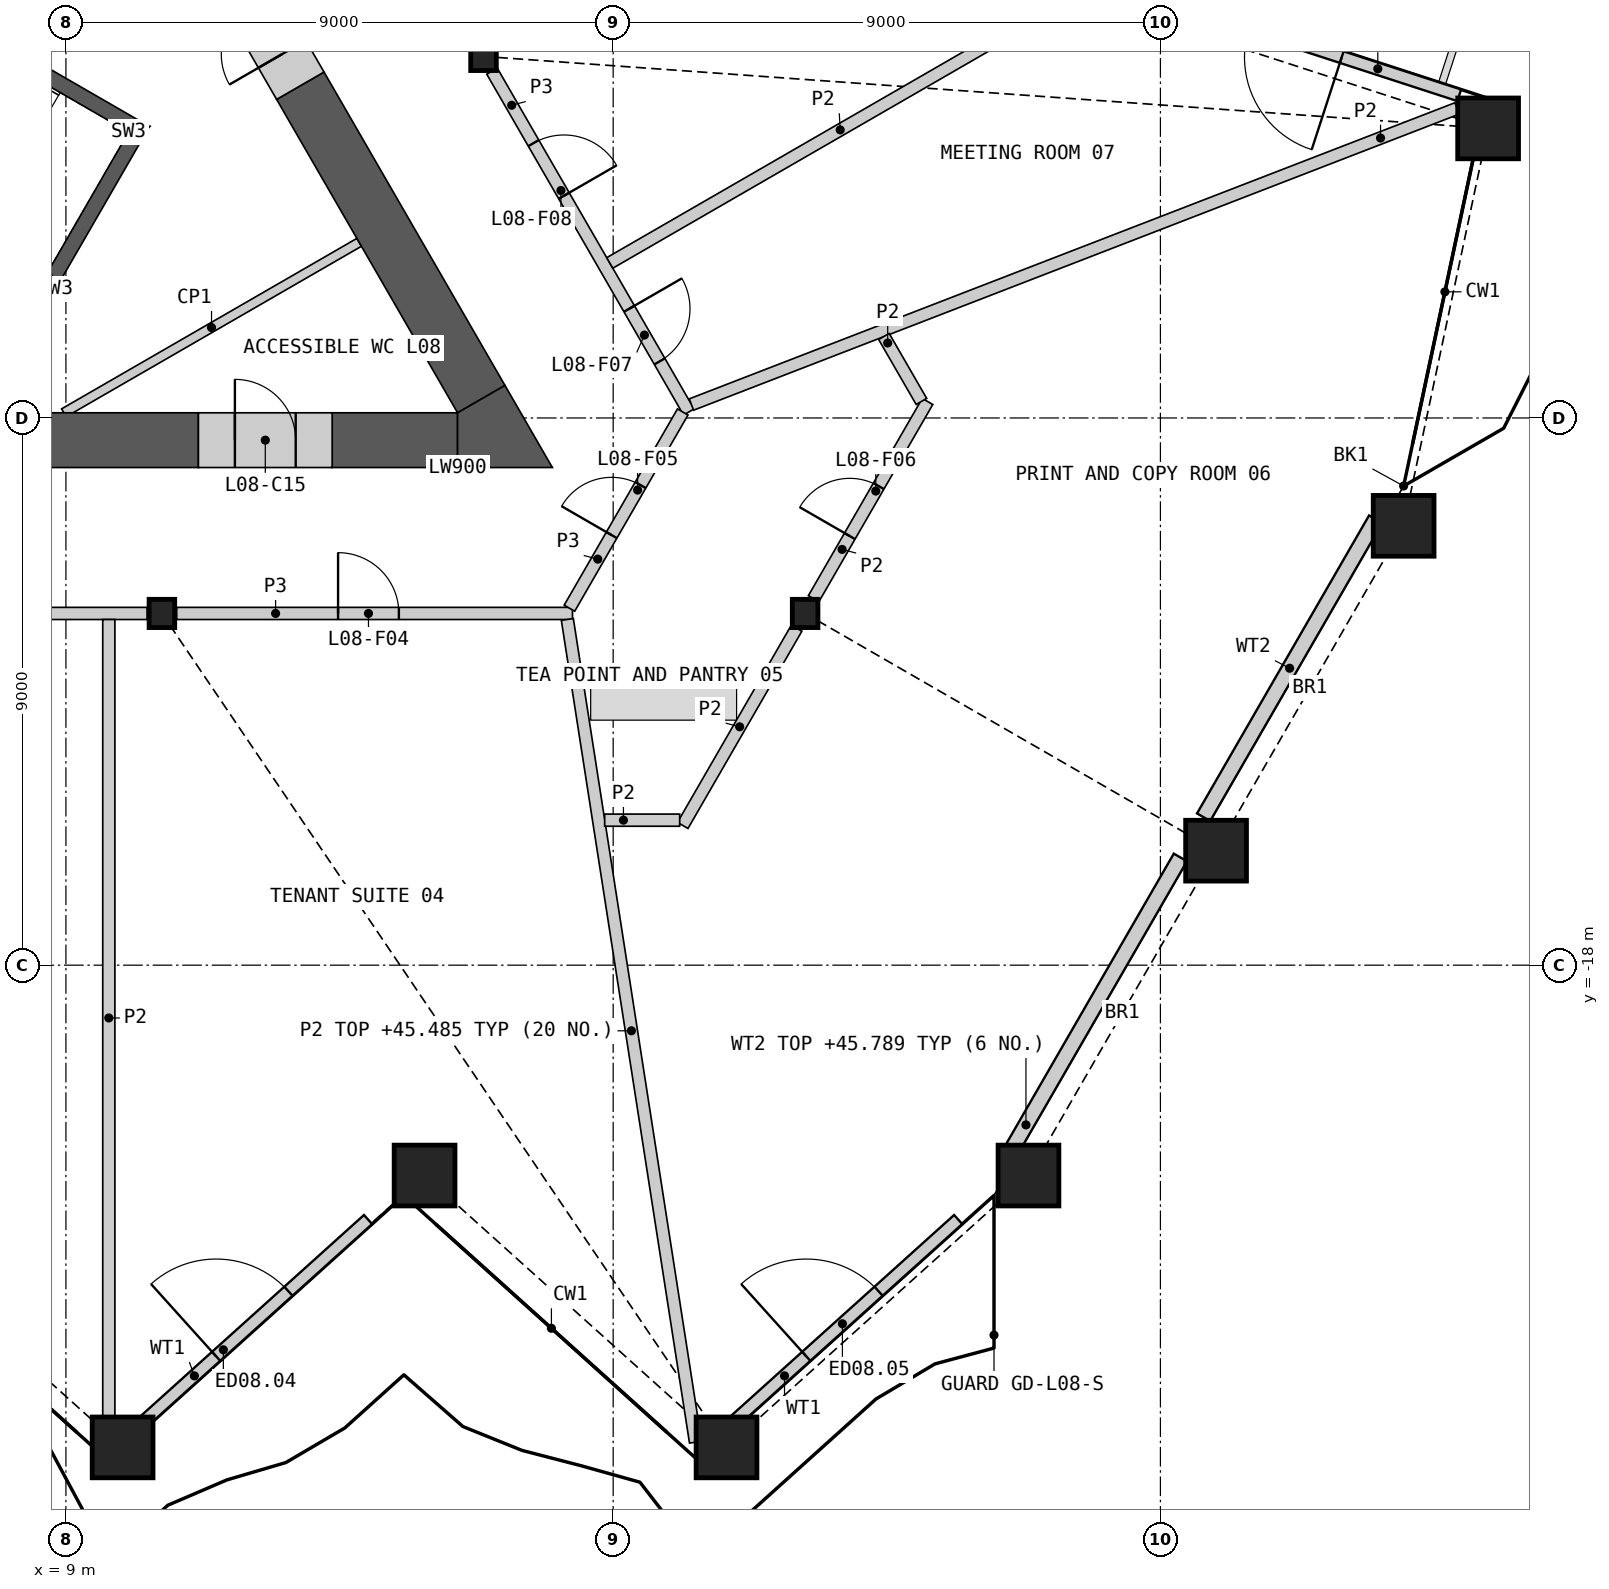
"""IFC4 building model, lengths in metres.
Left out: names, types, materials, properties, quantities, classifications, styles, units other than length and angle.
Written with IfcOpenShell. Run it as: python <this file> out.ifc"""

import sys

from ifc_helpers import new_model, si_unit, direction, frame, frame_2d, origin, origin_2d, place, context, subcontext, project, spatial, polyline, rectangle, hollow_rectangle, i_section, outline, extrude, element, fill, save


model = new_model("IFC4")
c1 = context("Model", 3, precision=1e-05, world=origin(), true_north=direction((0.0, 1.0)))
c2 = subcontext(c1, "Body", "Model", "MODEL_VIEW")
j1 = project(units=[si_unit("LENGTHUNIT", "METRE"), si_unit("PLANEANGLEUNIT", "RADIAN")], contexts=[c1])
p1 = place(None, origin())
s1 = spatial("IfcSite", under=j1, at=p1, CompositionType="ELEMENT")
p2 = place(p1, origin())
s2 = spatial("IfcBuilding", under=s1, at=p2, CompositionType="ELEMENT")
p3 = place(p2, frame((0.0, 0.0, 42.6)))
s3 = spatial("IfcBuildingStorey", under=s2, at=p3, CompositionType="ELEMENT", Elevation=42.6)
for number, where, z_axis, x_axis in (
    (1, (9.932, -25.931, 0.0), (0.0, 0.0, 1.0), (1.0, 0.0, 0.0)),
    (2, (14.898, -21.46, 0.0), (0.0, 0.0, 1.0), (1.0, 0.0, 0.0)),
    (3, (19.864, -25.931, 0.0), (0.0, 0.0, 1.0), (1.0, 0.0, 0.0)),
    (4, (24.83, -21.46, 0.0), (0.0, 0.0, 1.0), (1.0, 0.0, 0.0)),
    (5, (27.915, -16.117, 0.0), (0.0, 0.0, 1.0), (1.0, 0.0, 0.0)),
    (6, (31.0, -10.774, 0.0), (0.0, 0.0, 1.0), (1.0, 0.0, 0.0)),
    (7, (32.389, -4.237, 0.0), (0.0, 0.0, 1.0), (1.0, 0.0, 0.0)),
):
    element("IfcColumn", number, at=place(p3, frame(where, z_axis=z_axis, x_axis=x_axis)), inside=s3, PredefinedType="COLUMN", context=c2, shape_type="SweptSolid", body=[
        extrude(hollow_rectangle(XDim=1.0, YDim=1.0, WallThickness=0.07, at=origin_2d()), origin(), (0.0, 0.0, 1.0), 4.2),
    ])
for number, where, z_axis, x_axis in (
    (8, (10.578, -12.215, 0.0), (0.0, 0.0, 1.0), (1.0, 0.0, 0.0)),
    (9, (21.157, -12.215, 0.0), (0.0, 0.0, 1.0), (1.0, 0.0, 0.0)),
    (10, (15.868, -3.054, 0.0), (0.0, 0.0, 1.0), (1.0, 0.0, 0.0)),
):
    element("IfcColumn", number, at=place(p3, frame(where, z_axis=z_axis, x_axis=x_axis)), inside=s3, PredefinedType="COLUMN", context=c2, shape_type="SweptSolid", body=[
        extrude(i_section(OverallWidth=0.421, OverallDepth=0.465, WebThickness=0.045, FlangeThickness=0.072, at=origin_2d()), origin(), (0.0, 0.0, 1.0), 4.2),
    ])
p4 = place(p3, frame((10.161, -25.612, 0.0), z_axis=(0.0, 0.0, 1.0), x_axis=(0.743159085791, 0.669114768337, 0.0)))
e11 = element("IfcWall", 11, at=p4, inside=s3, PredefinedType="SOLIDWALL", context=c2, shape_type="SweptSolid", body=[
    extrude(rectangle(XDim=5.124, YDim=0.2, at=frame_2d((2.562, 0.0))), origin(), (0.0, 0.0, 1.0), 3.189),
])
p5 = place(p4, frame((1.762, 0.0, 0.0)))
e12 = element("IfcOpeningElement", 12, at=p5, cuts=e11, PredefinedType="OPENING", context=c2, shape_type="SweptSolid", body=[
    extrude(rectangle(XDim=1.6, YDim=2.4, at=frame_2d((0.8, 1.2))), frame((0.0, 0.11, 0.0), z_axis=(0.0, -1.0, 0.0), x_axis=(1.0, 0.0, 0.0)), (0.0, 0.0, 1.0), 0.22),
])
p6 = place(p3, frame((19.866, -25.612, 0.0), z_axis=(0.0, 0.0, 1.0), x_axis=(0.743159085791, 0.669114768337, 0.0)))
e13 = element("IfcWall", 13, at=p6, inside=s3, PredefinedType="SOLIDWALL", context=c2, shape_type="SweptSolid", body=[
    extrude(rectangle(XDim=5.124, YDim=0.2, at=frame_2d((2.562, 0.0))), origin(), (0.0, 0.0, 1.0), 3.189),
])
p7 = place(p6, frame((1.762, 0.0, 0.0)))
e14 = element("IfcOpeningElement", 14, at=p7, cuts=e13, PredefinedType="OPENING", context=c2, shape_type="SweptSolid", body=[
    extrude(rectangle(XDim=1.6, YDim=2.4, at=frame_2d((0.8, 1.2))), frame((0.0, 0.11, 0.0), z_axis=(0.0, -1.0, 0.0), x_axis=(1.0, 0.0, 0.0)), (0.0, 0.0, 1.0), 0.22),
])
p8 = place(p3, frame((24.507, -21.116, 0.0), z_axis=(0.0, 0.0, 1.0), x_axis=(0.49999579099, 0.866027833844, 0.0)))
e15 = element("IfcWall", 15, at=p8, inside=s3, PredefinedType="SOLIDWALL", context=c2, shape_type="SweptSolid", body=[
    extrude(rectangle(XDim=5.644, YDim=0.25, at=frame_2d((2.822, 0.0))), origin(), (0.0, 0.0, 1.0), 3.189),
])
p9 = place(p3, frame((27.71, -15.567, 0.0), z_axis=(0.0, 0.0, 1.0), x_axis=(0.499985074313, 0.866034020963, 0.0)))
e16 = element("IfcWall", 16, at=p9, inside=s3, PredefinedType="SOLIDWALL", context=c2, shape_type="SweptSolid", body=[
    extrude(rectangle(XDim=5.66, YDim=0.25, at=frame_2d((2.83, 0.0))), origin(), (0.0, 0.0, 1.0), 3.189),
])
p10 = place(p3, frame((31.914, -3.693, 0.0), z_axis=(0.0, 0.0, 1.0), x_axis=(-0.951049360908, 0.309039015525, 0.0)))
e17 = element("IfcWall", 17, at=p10, inside=s3, PredefinedType="SOLIDWALL", context=c2, shape_type="SweptSolid", body=[
    extrude(rectangle(XDim=5.631, YDim=0.2, at=frame_2d((2.815, 0.0))), origin(), (0.0, 0.0, 1.0), 3.189),
])
p11 = place(p10, frame((2.031, 0.0, 0.0)))
e18 = element("IfcOpeningElement", 18, at=p11, cuts=e17, PredefinedType="OPENING", context=c2, shape_type="SweptSolid", body=[
    extrude(rectangle(XDim=1.6, YDim=2.4, at=frame_2d((0.8, 1.2))), frame((0.0, 0.11, 0.0), z_axis=(0.0, -1.0, 0.0), x_axis=(1.0, 0.0, 0.0)), (0.0, 0.0, 1.0), 0.22),
])
p12 = place(p3, origin())
e19 = element("IfcWall", 19, at=p12, inside=s3, PredefinedType="SHEAR", context=c2, shape_type="SweptSolid", body=[
    extrude(outline(polyline([(3.763, -3.956), (8.83, -6.881), (8.738, -6.539), (3.888, -3.739), (3.763, -3.956)])), origin(), (0.0, 0.0, 1.0), 3.8),
])
p13 = place(p3, origin())
e20 = element("IfcWall", 20, at=p13, inside=s3, PredefinedType="SHEAR", context=c2, shape_type="SweptSolid", body=[
    extrude(outline(polyline([(8.83, -6.881), (10.374, -4.206), (10.032, -4.298), (8.738, -6.539), (8.83, -6.881)])), origin(), (0.0, 0.0, 1.0), 3.8),
])
p14 = place(p3, origin())
e21 = element("IfcWall", 21, at=p14, inside=s3, PredefinedType="SHEAR", context=c2, shape_type="SweptSolid", body=[
    extrude(outline(polyline([(10.032, -4.298), (10.374, -4.206), (5.307, -1.281), (5.182, -1.498), (10.032, -4.298)])), origin(), (0.0, 0.0, 1.0), 3.8),
])
p15 = place(p3, frame((13.823, -6.111, 0.0), z_axis=(0.0, 0.0, 1.0), x_axis=(-0.866026802741, -0.499997576928, 0.0)))
e22 = element("IfcWall", 22, at=p15, inside=s3, PredefinedType="PARTITIONING", context=c2, shape_type="SweptSolid", body=[
    extrude(rectangle(XDim=5.607, YDim=0.15, at=frame_2d((2.804, 0.0))), origin(), (0.0, 0.0, 1.0), 3.8),
])
p16 = place(p3, frame((-4.371, -9.365, 0.0), z_axis=(0.0, 0.0, 1.0), x_axis=(1.0, 0.0, 0.0)))
e23 = element("IfcWall", 23, at=p16, inside=s3, PredefinedType="SHEAR", context=c2, shape_type="SweptSolid", body=[
    extrude(rectangle(XDim=15.55, YDim=0.9, at=frame_2d((7.775, 0.0))), origin(), (0.0, 0.0, 1.0), 3.8),
])
p17 = place(p3, frame((13.379, -9.365, 0.0), z_axis=(0.0, 0.0, 1.0), x_axis=(1.0, 0.0, 0.0)))
e24 = element("IfcWall", 24, at=p17, inside=s3, PredefinedType="SHEAR", context=c2, shape_type="SweptSolid", body=[
    extrude(rectangle(XDim=2.062, YDim=0.9, at=frame_2d((1.031, 0.0))), origin(), (0.0, 0.0, 1.0), 3.8),
])
p18 = place(p3, frame((15.831, -8.69, 0.0), z_axis=(0.0, 0.0, 1.0), x_axis=(-0.499999419053, 0.866025739194, 0.0)))
e25 = element("IfcWall", 25, at=p18, inside=s3, PredefinedType="SHEAR", context=c2, shape_type="SweptSolid", body=[
    extrude(rectangle(XDim=5.952, YDim=0.9, at=frame_2d((2.976, 0.0))), origin(), (0.0, 0.0, 1.0), 3.8),
])
p19 = place(p3, origin())
e26 = element("IfcWall", 26, at=p19, inside=s3, PredefinedType="SHEAR", context=c2, shape_type="SweptSolid", body=[
    extrude(outline(polyline([(15.441, -9.815), (15.441, -8.915), (16.221, -8.465), (17.0, -9.815), (15.441, -9.815)])), origin(), (0.0, 0.0, 1.0), 3.8),
])
p20 = place(p3, frame((11.179, -9.365, 0.0), z_axis=(0.0, 0.0, 1.0), x_axis=(1.0, 0.0, 0.0)))
e27 = element("IfcWall", 27, at=p20, inside=s3, PredefinedType="SHEAR", context=c2, shape_type="SweptSolid", body=[
    extrude(rectangle(XDim=2.2, YDim=0.9, at=frame_2d((1.1, 0.0))), origin(), (0.0, 0.0, 1.0), 3.8),
])
p21 = place(p20, frame((0.6, 0.0, 0.0)))
e28 = element("IfcOpeningElement", 28, at=p21, cuts=e27, PredefinedType="OPENING", context=c2, shape_type="SweptSolid", body=[
    extrude(rectangle(XDim=1.0, YDim=2.1, at=frame_2d((0.5, 1.05))), frame((0.0, 0.46, 0.0), z_axis=(0.0, -1.0, 0.0), x_axis=(1.0, 0.0, 0.0)), (0.0, 0.0, 1.0), 0.92),
])
p22 = place(p3, frame((12.855, -3.536, 0.0), z_axis=(0.0, 0.0, 1.0), x_axis=(-0.50002983664, 0.866008176907, 0.0)))
e29 = element("IfcWall", 29, at=p22, inside=s3, PredefinedType="SHEAR", context=c2, shape_type="SweptSolid", body=[
    extrude(rectangle(XDim=2.2, YDim=0.9, at=frame_2d((1.1, 0.0))), origin(), (0.0, 0.0, 1.0), 3.8),
])
p23 = place(p22, frame((0.6, 0.0, 0.0)))
e30 = element("IfcOpeningElement", 30, at=p23, cuts=e29, PredefinedType="OPENING", context=c2, shape_type="SweptSolid", body=[
    extrude(rectangle(XDim=1.0, YDim=2.1, at=frame_2d((0.5, 1.05))), frame((0.0, 0.46, 0.0), z_axis=(0.0, -1.0, 0.0), x_axis=(1.0, 0.0, 0.0)), (0.0, 0.0, 1.0), 0.92),
])
p24 = place(p3, frame((0.242, -12.215, 0.0), z_axis=(0.0, 0.0, 1.0), x_axis=(1.0, 0.0, 0.0)))
e31 = element("IfcWall", 31, at=p24, inside=s3, PredefinedType="PARTITIONING", context=c2, shape_type="SweptSolid", body=[
    extrude(rectangle(XDim=10.094, YDim=0.2, at=frame_2d((5.047, 0.0))), origin(), (0.0, 0.0, 1.0), 3.8),
])
p25 = place(p24, frame((4.193, 0.0, 0.0)))
e32 = element("IfcOpeningElement", 32, at=p25, cuts=e31, PredefinedType="OPENING", context=c2, shape_type="SweptSolid", body=[
    extrude(rectangle(XDim=1.0, YDim=2.1, at=frame_2d((0.5, 1.05))), frame((0.0, 0.11, 0.0), z_axis=(0.0, -1.0, 0.0), x_axis=(1.0, 0.0, 0.0)), (0.0, 0.0, 1.0), 0.22),
])
p26 = place(p3, frame((10.821, -12.215, 0.0), z_axis=(0.0, 0.0, 1.0), x_axis=(1.0, 0.0, 0.0)))
e33 = element("IfcWall", 33, at=p26, inside=s3, PredefinedType="PARTITIONING", context=c2, shape_type="SweptSolid", body=[
    extrude(rectangle(XDim=6.51, YDim=0.2, at=frame_2d((3.255, 0.0))), origin(), (0.0, 0.0, 1.0), 3.8),
])
p27 = place(p26, frame((2.655, 0.0, 0.0)))
e34 = element("IfcOpeningElement", 34, at=p27, cuts=e33, PredefinedType="OPENING", context=c2, shape_type="SweptSolid", body=[
    extrude(rectangle(XDim=1.0, YDim=2.1, at=frame_2d((0.5, 1.05))), frame((0.0, 0.11, 0.0), z_axis=(0.0, -1.0, 0.0), x_axis=(1.0, 0.0, 0.0)), (0.0, 0.0, 1.0), 0.22),
])
p28 = place(p3, frame((16.008, -3.296, 0.0), z_axis=(0.0, 0.0, 1.0), x_axis=(0.499984737558, -0.86603421538, 0.0)))
e35 = element("IfcWall", 35, at=p28, inside=s3, PredefinedType="PARTITIONING", context=c2, shape_type="SweptSolid", body=[
    extrude(rectangle(XDim=6.473, YDim=0.2, at=frame_2d((3.236, 0.0))), origin(), (0.0, 0.0, 1.0), 3.8),
])
p29 = place(p28, frame((4.512, 0.0, 0.0)))
e36 = element("IfcOpeningElement", 36, at=p29, cuts=e35, PredefinedType="OPENING", context=c2, shape_type="SweptSolid", body=[
    extrude(rectangle(XDim=1.0, YDim=2.1, at=frame_2d((0.5, 1.05))), frame((0.0, 0.11, 0.0), z_axis=(0.0, -1.0, 0.0), x_axis=(1.0, 0.0, 0.0)), (0.0, 0.0, 1.0), 0.22),
])
p30 = place(p28, frame((1.366, 0.0, 0.0)))
e37 = element("IfcOpeningElement", 37, at=p30, cuts=e35, PredefinedType="OPENING", context=c2, shape_type="SweptSolid", body=[
    extrude(rectangle(XDim=1.0, YDim=2.1, at=frame_2d((0.5, 1.05))), frame((0.0, 0.11, 0.0), z_axis=(0.0, -1.0, 0.0), x_axis=(1.0, 0.0, 0.0)), (0.0, 0.0, 1.0), 0.22),
])
p31 = place(p3, frame((17.281, -12.128, 0.0), z_axis=(0.0, 0.0, 1.0), x_axis=(0.499958791762, 0.866049194065, 0.0)))
e38 = element("IfcWall", 38, at=p31, inside=s3, PredefinedType="PARTITIONING", context=c2, shape_type="SweptSolid", body=[
    extrude(rectangle(XDim=3.726, YDim=0.2, at=frame_2d((1.863, 0.0))), origin(), (0.0, 0.0, 1.0), 3.8),
])
p32 = place(p31, frame((1.388, 0.0, 0.0)))
e39 = element("IfcOpeningElement", 39, at=p32, cuts=e38, PredefinedType="OPENING", context=c2, shape_type="SweptSolid", body=[
    extrude(rectangle(XDim=0.95, YDim=2.1, at=frame_2d((0.475, 1.05))), frame((0.0, 0.11, 0.0), z_axis=(0.0, -1.0, 0.0), x_axis=(1.0, 0.0, 0.0)), (0.0, 0.0, 1.0), 0.22),
])
p33 = place(p3, frame((17.246, -12.314, 0.0), z_axis=(0.0, 0.0, 1.0), x_axis=(0.153927101979, -0.98808220674, 0.0)))
e40 = element("IfcWall", 40, at=p33, inside=s3, PredefinedType="PARTITIONING", context=c2, shape_type="SweptSolid", body=[
    extrude(rectangle(XDim=13.694, YDim=0.2, at=frame_2d((6.847, 0.0))), origin(), (0.0, 0.0, 1.0), 2.885),
])
p34 = place(p3, frame((19.287, -8.779, 0.0), z_axis=(0.0, 0.0, 1.0), x_axis=(0.932669586354, 0.360731815467, 0.0)))
e41 = element("IfcWall", 41, at=p34, inside=s3, PredefinedType="PARTITIONING", context=c2, shape_type="SweptSolid", body=[
    extrude(rectangle(XDim=13.501, YDim=0.2, at=frame_2d((6.75, 0.0))), origin(), (0.0, 0.0, 1.0), 2.885),
])
p35 = place(p3, frame((9.705, -25.421, 0.0), z_axis=(0.0, 0.0, 1.0), x_axis=(0.0, 1.0, 0.0)))
e42 = element("IfcWall", 42, at=p35, inside=s3, PredefinedType="PARTITIONING", context=c2, shape_type="SweptSolid", body=[
    extrude(rectangle(XDim=13.106, YDim=0.2, at=frame_2d((6.553, 0.0))), origin(), (0.0, 0.0, 1.0), 2.885),
])
p36 = place(p3, frame((17.944, -6.45, 0.0), z_axis=(0.0, 0.0, 1.0), x_axis=(0.866025328989, 0.50000012955, 0.0)))
e43 = element("IfcWall", 43, at=p36, inside=s3, PredefinedType="PARTITIONING", context=c2, shape_type="SweptSolid", body=[
    extrude(rectangle(XDim=8.752, YDim=0.2, at=frame_2d((4.376, 0.0))), origin(), (0.0, 0.0, 1.0), 2.885),
])
p37 = place(p3, frame((21.297, -11.973, 0.0), z_axis=(0.0, 0.0, 1.0), x_axis=(0.500008291124, 0.866020616849, 0.0)))
e44 = element("IfcWall", 44, at=p37, inside=s3, PredefinedType="PARTITIONING", context=c2, shape_type="SweptSolid", body=[
    extrude(rectangle(XDim=3.746, YDim=0.2, at=frame_2d((1.873, 0.0))), origin(), (0.0, 0.0, 1.0), 2.885),
])
p38 = place(p37, frame((1.189, 0.0, 0.0)))
e45 = element("IfcOpeningElement", 45, at=p38, cuts=e44, PredefinedType="OPENING", context=c2, shape_type="SweptSolid", body=[
    extrude(rectangle(XDim=0.95, YDim=2.1, at=frame_2d((0.475, 1.05))), frame((0.0, 0.11, 0.0), z_axis=(0.0, -1.0, 0.0), x_axis=(1.0, 0.0, 0.0)), (0.0, 0.0, 1.0), 0.22),
])
p39 = place(p3, frame((19.144, -15.702, 0.0), z_axis=(0.0, 0.0, 1.0), x_axis=(0.500028947347, 0.866008690381, 0.0)))
e46 = element("IfcWall", 46, at=p39, inside=s3, PredefinedType="PARTITIONING", context=c2, shape_type="SweptSolid", body=[
    extrude(rectangle(XDim=3.746, YDim=0.2, at=frame_2d((1.873, 0.0))), origin(), (0.0, 0.0, 1.0), 2.885),
])
p40 = place(p3, frame((22.453, -7.66, 0.0), z_axis=(0.0, 0.0, 1.0), x_axis=(0.499928040405, -0.86606694569, 0.0)))
e47 = element("IfcWall", 47, at=p40, inside=s3, PredefinedType="PARTITIONING", context=c2, shape_type="SweptSolid", body=[
    extrude(rectangle(XDim=1.234, YDim=0.2, at=frame_2d((0.617, 0.0))), origin(), (0.0, 0.0, 1.0), 2.885),
])
p41 = place(p3, frame((17.861, -15.615, 0.0), z_axis=(0.0, 0.0, 1.0), x_axis=(1.0, 0.0, 0.0)))
e48 = element("IfcWall", 48, at=p41, inside=s3, PredefinedType="PARTITIONING", context=c2, shape_type="SweptSolid", body=[
    extrude(rectangle(XDim=1.233, YDim=0.2, at=frame_2d((0.617, 0.0))), origin(), (0.0, 0.0, 1.0), 2.885),
])
p42 = place(p5, origin())
e49 = element("IfcDoor", 49, at=p42, inside=s3, OperationType="DOUBLE_DOOR_SINGLE_SWING", PredefinedType="DOOR", context=c2, shape_type="SweptSolid", body=[
    extrude(rectangle(XDim=1.6, YDim=2.4, at=frame_2d((0.8, 1.2))), frame((0.0, 0.025, 0.0), z_axis=(0.0, -1.0, 0.0), x_axis=(1.0, 0.0, 0.0)), (0.0, 0.0, 1.0), 0.05),
])
fill(e12, e49)
p43 = place(p7, origin())
e50 = element("IfcDoor", 50, at=p43, inside=s3, OperationType="DOUBLE_DOOR_SINGLE_SWING", PredefinedType="DOOR", context=c2, shape_type="SweptSolid", body=[
    extrude(rectangle(XDim=1.6, YDim=2.4, at=frame_2d((0.8, 1.2))), frame((0.0, 0.025, 0.0), z_axis=(0.0, -1.0, 0.0), x_axis=(1.0, 0.0, 0.0)), (0.0, 0.0, 1.0), 0.05),
])
fill(e14, e50)
p44 = place(p11, origin())
e51 = element("IfcDoor", 51, at=p44, inside=s3, OperationType="DOUBLE_DOOR_SINGLE_SWING", PredefinedType="DOOR", context=c2, shape_type="SweptSolid", body=[
    extrude(rectangle(XDim=1.6, YDim=2.4, at=frame_2d((0.8, 1.2))), frame((0.0, 0.025, 0.0), z_axis=(0.0, -1.0, 0.0), x_axis=(1.0, 0.0, 0.0)), (0.0, 0.0, 1.0), 0.05),
])
fill(e18, e51)
p45 = place(p21, origin())
e52 = element("IfcDoor", 52, at=p45, inside=s3, OperationType="SINGLE_SWING_LEFT", PredefinedType="DOOR", context=c2, shape_type="SweptSolid", body=[
    extrude(rectangle(XDim=1.0, YDim=2.1, at=frame_2d((0.5, 1.05))), frame((0.0, 0.205, 0.0), z_axis=(0.0, -1.0, 0.0), x_axis=(1.0, 0.0, 0.0)), (0.0, 0.0, 1.0), 0.05),
])
fill(e28, e52)
p46 = place(p23, origin())
e53 = element("IfcDoor", 53, at=p46, inside=s3, OperationType="SINGLE_SWING_LEFT", PredefinedType="DOOR", context=c2, shape_type="SweptSolid", body=[
    extrude(rectangle(XDim=1.0, YDim=2.1, at=frame_2d((0.5, 1.05))), frame((0.0, 0.205, 0.0), z_axis=(0.0, -1.0, 0.0), x_axis=(1.0, 0.0, 0.0)), (0.0, 0.0, 1.0), 0.05),
])
fill(e30, e53)
p47 = place(p27, origin())
e54 = element("IfcDoor", 54, at=p47, inside=s3, OperationType="SINGLE_SWING_LEFT", PredefinedType="DOOR", context=c2, shape_type="SweptSolid", body=[
    extrude(rectangle(XDim=1.0, YDim=2.1, at=frame_2d((0.5, 1.05))), frame((0.0, 0.025, 0.0), z_axis=(0.0, -1.0, 0.0), x_axis=(1.0, 0.0, 0.0)), (0.0, 0.0, 1.0), 0.05),
])
fill(e34, e54)
p48 = place(p32, origin())
e55 = element("IfcDoor", 55, at=p48, inside=s3, OperationType="SINGLE_SWING_LEFT", PredefinedType="DOOR", context=c2, shape_type="SweptSolid", body=[
    extrude(rectangle(XDim=0.95, YDim=2.1, at=frame_2d((0.475, 1.05))), frame((0.0, 0.025, 0.0), z_axis=(0.0, -1.0, 0.0), x_axis=(1.0, 0.0, 0.0)), (0.0, 0.0, 1.0), 0.05),
])
fill(e39, e55)
p49 = place(p38, origin())
e56 = element("IfcDoor", 56, at=p49, inside=s3, OperationType="SINGLE_SWING_LEFT", PredefinedType="DOOR", context=c2, shape_type="SweptSolid", body=[
    extrude(rectangle(XDim=0.95, YDim=2.1, at=frame_2d((0.475, 1.05))), frame((0.0, 0.025, 0.0), z_axis=(0.0, -1.0, 0.0), x_axis=(1.0, 0.0, 0.0)), (0.0, 0.0, 1.0), 0.05),
])
fill(e45, e56)
p50 = place(p29, origin())
e57 = element("IfcDoor", 57, at=p50, inside=s3, OperationType="SINGLE_SWING_LEFT", PredefinedType="DOOR", context=c2, shape_type="SweptSolid", body=[
    extrude(rectangle(XDim=1.0, YDim=2.1, at=frame_2d((0.5, 1.05))), frame((0.0, 0.025, 0.0), z_axis=(0.0, -1.0, 0.0), x_axis=(1.0, 0.0, 0.0)), (0.0, 0.0, 1.0), 0.05),
])
fill(e36, e57)
p51 = place(p30, origin())
e58 = element("IfcDoor", 58, at=p51, inside=s3, OperationType="SINGLE_SWING_RIGHT", PredefinedType="DOOR", context=c2, shape_type="SweptSolid", body=[
    extrude(rectangle(XDim=1.0, YDim=2.1, at=frame_2d((0.5, 1.05))), frame((0.0, 0.025, 0.0), z_axis=(0.0, -1.0, 0.0), x_axis=(1.0, 0.0, 0.0)), (0.0, 0.0, 1.0), 0.05),
])
fill(e37, e58)
save(model, sys.argv[1])
